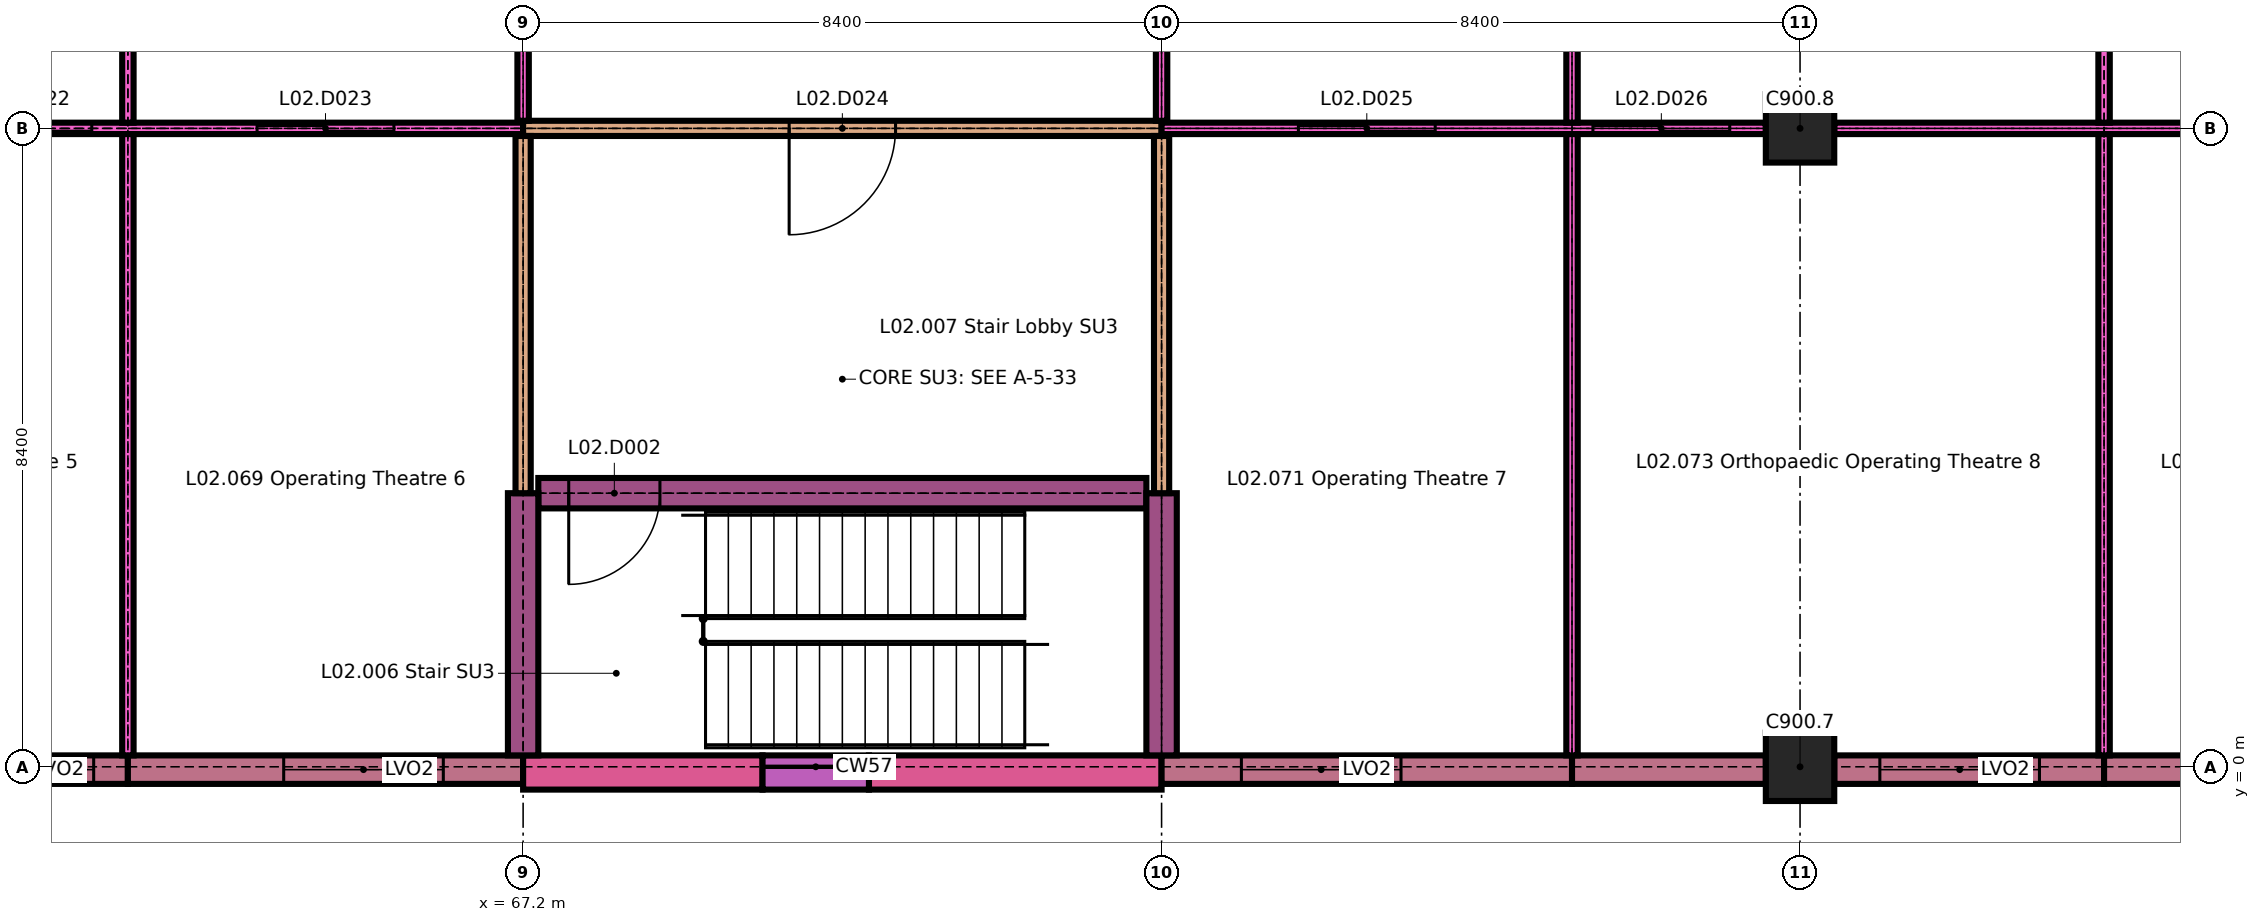
"""IFC4 building model, lengths in metres.
Left out: names, types, materials, properties, quantities, classifications, styles, units other than length and angle.
Written with IfcOpenShell. Run it as: python <this file> out.ifc"""

import sys

from ifc_helpers import new_model, si_unit, direction, frame, frame_2d, origin, origin_2d, place, context, subcontext, project, spatial, rectangle, extrude, element, fill, save


model = new_model("IFC4")
c1 = context("Model", 3, precision=1e-05, world=origin(), true_north=direction((0.0, 1.0)))
c2 = subcontext(c1, "Body", "Model", "MODEL_VIEW")
j1 = project(units=[si_unit("LENGTHUNIT", "METRE"), si_unit("PLANEANGLEUNIT", "RADIAN")], contexts=[c1])
p1 = place(None, origin())
s1 = spatial("IfcSite", under=j1, at=p1, CompositionType="ELEMENT")
p2 = place(p1, origin())
s2 = spatial("IfcBuilding", under=s1, at=p2, CompositionType="ELEMENT")
p3 = place(p2, frame((0.0, 0.0, 8.4)))
s3 = spatial("IfcBuildingStorey", under=s2, at=p3, CompositionType="ELEMENT", Elevation=8.4)
for number, where, z_axis, x_axis in (
    (1, (84.0, 0.0, 0.0), (0.0, 0.0, 1.0), (1.0, 0.0, 0.0)),
    (2, (84.0, 8.4, 0.0), (0.0, 0.0, 1.0), (1.0, 0.0, 0.0)),
):
    element("IfcColumn", number, at=place(p3, frame(where, z_axis=z_axis, x_axis=x_axis)), inside=s3, PredefinedType="COLUMN", context=c2, shape_type="SweptSolid", body=[
        extrude(rectangle(XDim=0.9, YDim=0.9, at=origin_2d()), origin(), (0.0, 0.0, 1.0), 4.2),
    ])
p4 = place(p3, frame((59.25, -0.038, 0.0), z_axis=(0.0, 0.0, 1.0), x_axis=(1.0, 0.0, 0.0)))
e3 = element("IfcWall", 3, at=p4, inside=s3, PredefinedType="SOLIDWALL", context=c2, shape_type="SweptSolid", body=[
    extrude(rectangle(XDim=2.75, YDim=0.375, at=frame_2d((1.375, 0.0))), origin(), (0.0, 0.0, 1.0), 3.9),
])
p5 = place(p4, frame((0.2, 0.0, 0.9)))
e4 = element("IfcOpeningElement", 4, at=p5, cuts=e3, PredefinedType="OPENING", context=c2, shape_type="SweptSolid", body=[
    extrude(rectangle(XDim=2.1, YDim=2.4, at=frame_2d((1.05, 1.2))), frame((0.0, 0.198, 0.0), z_axis=(0.0, -1.0, 0.0), x_axis=(1.0, 0.0, 0.0)), (0.0, 0.0, 1.0), 0.395),
])
p6 = place(p3, frame((62.0, -0.038, 0.0), z_axis=(0.0, 0.0, 1.0), x_axis=(1.0, 0.0, 0.0)))
e5 = element("IfcWall", 5, at=p6, inside=s3, PredefinedType="SOLIDWALL", context=c2, shape_type="SweptSolid", body=[
    extrude(rectangle(XDim=5.2, YDim=0.375, at=frame_2d((2.6, 0.0))), origin(), (0.0, 0.0, 1.0), 3.9),
])
p7 = place(p6, frame((2.05, 0.0, 0.9)))
e6 = element("IfcOpeningElement", 6, at=p7, cuts=e5, PredefinedType="OPENING", context=c2, shape_type="SweptSolid", body=[
    extrude(rectangle(XDim=2.1, YDim=2.4, at=frame_2d((1.05, 1.2))), frame((0.0, 0.198, 0.0), z_axis=(0.0, -1.0, 0.0), x_axis=(1.0, 0.0, 0.0)), (0.0, 0.0, 1.0), 0.395),
])
p8 = place(p3, frame((67.2, -0.075, 0.0), z_axis=(0.0, 0.0, 1.0), x_axis=(1.0, 0.0, 0.0)))
e7 = element("IfcWall", 7, at=p8, inside=s3, PredefinedType="SOLIDWALL", context=c2, shape_type="SweptSolid", body=[
    extrude(rectangle(XDim=3.15, YDim=0.45, at=frame_2d((1.575, 0.0))), origin(), (0.0, 0.0, 1.0), 4.2),
])
p9 = place(p3, frame((71.75, -0.075, 0.0), z_axis=(0.0, 0.0, 1.0), x_axis=(1.0, 0.0, 0.0)))
e8 = element("IfcWall", 8, at=p9, inside=s3, PredefinedType="SOLIDWALL", context=c2, shape_type="SweptSolid", body=[
    extrude(rectangle(XDim=3.85, YDim=0.45, at=frame_2d((1.925, 0.0))), origin(), (0.0, 0.0, 1.0), 4.2),
])
p10 = place(p3, frame((70.35, -0.075, 0.0), z_axis=(0.0, 0.0, 1.0), x_axis=(1.0, 0.0, 0.0)))
e9 = element("IfcWall", 9, at=p10, inside=s3, PredefinedType="SOLIDWALL", context=c2, shape_type="SweptSolid", body=[
    extrude(rectangle(XDim=1.4, YDim=0.45, at=frame_2d((0.7, 0.0))), origin(), (0.0, 0.0, 1.0), 0.6),
])
p11 = place(p3, frame((75.6, -0.038, 0.0), z_axis=(0.0, 0.0, 1.0), x_axis=(1.0, 0.0, 0.0)))
e10 = element("IfcWall", 10, at=p11, inside=s3, PredefinedType="SOLIDWALL", context=c2, shape_type="SweptSolid", body=[
    extrude(rectangle(XDim=5.4, YDim=0.375, at=frame_2d((2.7, 0.0))), origin(), (0.0, 0.0, 1.0), 3.9),
])
p12 = place(p11, frame((1.05, 0.0, 0.9)))
e11 = element("IfcOpeningElement", 11, at=p12, cuts=e10, PredefinedType="OPENING", context=c2, shape_type="SweptSolid", body=[
    extrude(rectangle(XDim=2.1, YDim=2.4, at=frame_2d((1.05, 1.2))), frame((0.0, 0.198, 0.0), z_axis=(0.0, -1.0, 0.0), x_axis=(1.0, 0.0, 0.0)), (0.0, 0.0, 1.0), 0.395),
])
p13 = place(p3, frame((81.0, -0.038, 0.0), z_axis=(0.0, 0.0, 1.0), x_axis=(1.0, 0.0, 0.0)))
e12 = element("IfcWall", 12, at=p13, inside=s3, PredefinedType="SOLIDWALL", context=c2, shape_type="SweptSolid", body=[
    extrude(rectangle(XDim=2.55, YDim=0.375, at=frame_2d((1.275, 0.0))), origin(), (0.0, 0.0, 1.0), 3.9),
])
p14 = place(p3, frame((84.45, -0.038, 0.0), z_axis=(0.0, 0.0, 1.0), x_axis=(1.0, 0.0, 0.0)))
e13 = element("IfcWall", 13, at=p14, inside=s3, PredefinedType="SOLIDWALL", context=c2, shape_type="SweptSolid", body=[
    extrude(rectangle(XDim=3.55, YDim=0.375, at=frame_2d((1.775, 0.0))), origin(), (0.0, 0.0, 1.0), 3.9),
])
p15 = place(p14, frame((0.6, 0.0, 0.9)))
e14 = element("IfcOpeningElement", 14, at=p15, cuts=e13, PredefinedType="OPENING", context=c2, shape_type="SweptSolid", body=[
    extrude(rectangle(XDim=2.1, YDim=2.4, at=frame_2d((1.05, 1.2))), frame((0.0, 0.198, 0.0), z_axis=(0.0, -1.0, 0.0), x_axis=(1.0, 0.0, 0.0)), (0.0, 0.0, 1.0), 0.395),
])
p16 = place(p3, frame((88.0, -0.038, 0.0), z_axis=(0.0, 0.0, 1.0), x_axis=(1.0, 0.0, 0.0)))
e15 = element("IfcWall", 15, at=p16, inside=s3, PredefinedType="SOLIDWALL", context=c2, shape_type="SweptSolid", body=[
    extrude(rectangle(XDim=3.95, YDim=0.375, at=frame_2d((1.975, 0.0))), origin(), (0.0, 0.0, 1.0), 3.9),
])
p17 = place(p16, frame((1.25, 0.0, 0.9)))
e16 = element("IfcOpeningElement", 16, at=p17, cuts=e15, PredefinedType="OPENING", context=c2, shape_type="SweptSolid", body=[
    extrude(rectangle(XDim=2.1, YDim=2.4, at=frame_2d((1.05, 1.2))), frame((0.0, 0.198, 0.0), z_axis=(0.0, -1.0, 0.0), x_axis=(1.0, 0.0, 0.0)), (0.0, 0.0, 1.0), 0.395),
])
p18 = place(p3, frame((67.4, 3.6, 0.0), z_axis=(0.0, 0.0, 1.0), x_axis=(1.0, 0.0, 0.0)))
e17 = element("IfcWall", 17, at=p18, inside=s3, PredefinedType="SHEAR", context=c2, shape_type="SweptSolid", body=[
    extrude(rectangle(XDim=8.0, YDim=0.4, at=frame_2d((4.0, 0.0))), origin(), (0.0, 0.0, 1.0), 4.2),
])
p19 = place(p18, frame((0.4, 0.0, 0.0)))
e18 = element("IfcOpeningElement", 18, at=p19, cuts=e17, PredefinedType="OPENING", context=c2, shape_type="SweptSolid", body=[
    extrude(rectangle(XDim=1.2, YDim=2.1, at=frame_2d((0.6, 1.05))), frame((0.0, 0.21, 0.0), z_axis=(0.0, -1.0, 0.0), x_axis=(1.0, 0.0, 0.0)), (0.0, 0.0, 1.0), 0.42),
])
p20 = place(p3, frame((59.25, 8.4, 0.0), z_axis=(0.0, 0.0, 1.0), x_axis=(1.0, 0.0, 0.0)))
e19 = element("IfcWall", 19, at=p20, inside=s3, PredefinedType="PARTITIONING", context=c2, shape_type="SweptSolid", body=[
    extrude(rectangle(XDim=7.95, YDim=0.15, at=frame_2d((3.975, 0.0))), origin(), (0.0, 0.0, 1.0), 4.2),
])
p21 = place(p20, frame((0.475, 0.0, 0.0)))
e20 = element("IfcOpeningElement", 20, at=p21, cuts=e19, PredefinedType="OPENING", context=c2, shape_type="SweptSolid", body=[
    extrude(rectangle(XDim=1.8, YDim=2.4, at=frame_2d((0.9, 1.2))), frame((0.0, 0.085, 0.0), z_axis=(0.0, -1.0, 0.0), x_axis=(1.0, 0.0, 0.0)), (0.0, 0.0, 1.0), 0.17),
])
p22 = place(p20, frame((4.45, 0.0, 0.0)))
e21 = element("IfcOpeningElement", 21, at=p22, cuts=e19, PredefinedType="OPENING", context=c2, shape_type="SweptSolid", body=[
    extrude(rectangle(XDim=1.8, YDim=2.4, at=frame_2d((0.9, 1.2))), frame((0.0, 0.085, 0.0), z_axis=(0.0, -1.0, 0.0), x_axis=(1.0, 0.0, 0.0)), (0.0, 0.0, 1.0), 0.17),
])
p23 = place(p3, frame((67.2, 8.4, 0.0), z_axis=(0.0, 0.0, 1.0), x_axis=(1.0, 0.0, 0.0)))
e22 = element("IfcWall", 22, at=p23, inside=s3, PredefinedType="PARTITIONING", context=c2, shape_type="SweptSolid", body=[
    extrude(rectangle(XDim=8.4, YDim=0.2, at=frame_2d((4.2, 0.0))), origin(), (0.0, 0.0, 1.0), 4.2),
])
p24 = place(p23, frame((3.5, 0.0, 0.0)))
e23 = element("IfcOpeningElement", 23, at=p24, cuts=e22, PredefinedType="OPENING", context=c2, shape_type="SweptSolid", body=[
    extrude(rectangle(XDim=1.4, YDim=2.1, at=frame_2d((0.7, 1.05))), frame((0.0, 0.11, 0.0), z_axis=(0.0, -1.0, 0.0), x_axis=(1.0, 0.0, 0.0)), (0.0, 0.0, 1.0), 0.22),
])
p25 = place(p3, frame((75.6, 8.4, 0.0), z_axis=(0.0, 0.0, 1.0), x_axis=(1.0, 0.0, 0.0)))
e24 = element("IfcWall", 24, at=p25, inside=s3, PredefinedType="PARTITIONING", context=c2, shape_type="SweptSolid", body=[
    extrude(rectangle(XDim=7.95, YDim=0.15, at=frame_2d((3.975, 0.0))), origin(), (0.0, 0.0, 1.0), 4.2),
])
p26 = place(p25, frame((1.8, 0.0, 0.0)))
e25 = element("IfcOpeningElement", 25, at=p26, cuts=e24, PredefinedType="OPENING", context=c2, shape_type="SweptSolid", body=[
    extrude(rectangle(XDim=1.8, YDim=2.4, at=frame_2d((0.9, 1.2))), frame((0.0, 0.085, 0.0), z_axis=(0.0, -1.0, 0.0), x_axis=(1.0, 0.0, 0.0)), (0.0, 0.0, 1.0), 0.17),
])
p27 = place(p25, frame((5.675, 0.0, 0.0)))
e26 = element("IfcOpeningElement", 26, at=p27, cuts=e24, PredefinedType="OPENING", context=c2, shape_type="SweptSolid", body=[
    extrude(rectangle(XDim=1.8, YDim=2.4, at=frame_2d((0.9, 1.2))), frame((0.0, 0.085, 0.0), z_axis=(0.0, -1.0, 0.0), x_axis=(1.0, 0.0, 0.0)), (0.0, 0.0, 1.0), 0.17),
])
p28 = place(p3, frame((84.45, 8.4, 0.0), z_axis=(0.0, 0.0, 1.0), x_axis=(1.0, 0.0, 0.0)))
e27 = element("IfcWall", 27, at=p28, inside=s3, PredefinedType="PARTITIONING", context=c2, shape_type="SweptSolid", body=[
    extrude(rectangle(XDim=7.5, YDim=0.15, at=frame_2d((3.75, 0.0))), origin(), (0.0, 0.0, 1.0), 4.2),
])
p29 = place(p28, frame((4.625, 0.0, 0.0)))
e28 = element("IfcOpeningElement", 28, at=p29, cuts=e27, PredefinedType="OPENING", context=c2, shape_type="SweptSolid", body=[
    extrude(rectangle(XDim=1.8, YDim=2.4, at=frame_2d((0.9, 1.2))), frame((0.0, 0.085, 0.0), z_axis=(0.0, -1.0, 0.0), x_axis=(1.0, 0.0, 0.0)), (0.0, 0.0, 1.0), 0.17),
])
p30 = place(p3, frame((62.0, 0.15, 0.0), z_axis=(0.0, 0.0, 1.0), x_axis=(0.0, 1.0, 0.0)))
e29 = element("IfcWall", 29, at=p30, inside=s3, PredefinedType="PARTITIONING", context=c2, shape_type="SweptSolid", body=[
    extrude(rectangle(XDim=8.175, YDim=0.15, at=frame_2d((4.087, 0.0))), origin(), (0.0, 0.0, 1.0), 4.2),
])
p31 = place(p3, frame((62.0, 8.475, 0.0), z_axis=(0.0, 0.0, 1.0), x_axis=(0.0, 1.0, 0.0)))
e30 = element("IfcWall", 30, at=p31, inside=s3, PredefinedType="PARTITIONING", context=c2, shape_type="SweptSolid", body=[
    extrude(rectangle(XDim=5.25, YDim=0.15, at=frame_2d((2.625, 0.0))), origin(), (0.0, 0.0, 1.0), 4.2),
])
p32 = place(p3, frame((67.2, 0.15, 0.0), z_axis=(0.0, 0.0, 1.0), x_axis=(0.0, 1.0, 0.0)))
e31 = element("IfcWall", 31, at=p32, inside=s3, PredefinedType="SHEAR", context=c2, shape_type="SweptSolid", body=[
    extrude(rectangle(XDim=3.45, YDim=0.4, at=frame_2d((1.725, 0.0))), origin(), (0.0, 0.0, 1.0), 4.2),
])
p33 = place(p3, frame((67.2, 3.6, 0.0), z_axis=(0.0, 0.0, 1.0), x_axis=(0.0, 1.0, 0.0)))
e32 = element("IfcWall", 32, at=p33, inside=s3, PredefinedType="PARTITIONING", context=c2, shape_type="SweptSolid", body=[
    extrude(rectangle(XDim=4.7, YDim=0.2, at=frame_2d((2.35, 0.0))), origin(), (0.0, 0.0, 1.0), 4.2),
])
p34 = place(p3, frame((67.2, 8.5, 0.0), z_axis=(0.0, 0.0, 1.0), x_axis=(0.0, 1.0, 0.0)))
e33 = element("IfcWall", 33, at=p34, inside=s3, PredefinedType="PARTITIONING", context=c2, shape_type="SweptSolid", body=[
    extrude(rectangle(XDim=5.225, YDim=0.15, at=frame_2d((2.613, 0.0))), origin(), (0.0, 0.0, 1.0), 4.2),
])
p35 = place(p3, frame((75.6, 0.15, 0.0), z_axis=(0.0, 0.0, 1.0), x_axis=(0.0, 1.0, 0.0)))
e34 = element("IfcWall", 34, at=p35, inside=s3, PredefinedType="SHEAR", context=c2, shape_type="SweptSolid", body=[
    extrude(rectangle(XDim=3.45, YDim=0.4, at=frame_2d((1.725, 0.0))), origin(), (0.0, 0.0, 1.0), 4.2),
])
p36 = place(p3, frame((75.6, 3.6, 0.0), z_axis=(0.0, 0.0, 1.0), x_axis=(0.0, 1.0, 0.0)))
e35 = element("IfcWall", 35, at=p36, inside=s3, PredefinedType="PARTITIONING", context=c2, shape_type="SweptSolid", body=[
    extrude(rectangle(XDim=4.7, YDim=0.2, at=frame_2d((2.35, 0.0))), origin(), (0.0, 0.0, 1.0), 4.2),
])
p37 = place(p3, frame((75.6, 8.5, 0.0), z_axis=(0.0, 0.0, 1.0), x_axis=(0.0, 1.0, 0.0)))
e36 = element("IfcWall", 36, at=p37, inside=s3, PredefinedType="PARTITIONING", context=c2, shape_type="SweptSolid", body=[
    extrude(rectangle(XDim=5.225, YDim=0.15, at=frame_2d((2.613, 0.0))), origin(), (0.0, 0.0, 1.0), 4.2),
])
p38 = place(p3, frame((81.0, 0.15, 0.0), z_axis=(0.0, 0.0, 1.0), x_axis=(0.0, 1.0, 0.0)))
e37 = element("IfcWall", 37, at=p38, inside=s3, PredefinedType="PARTITIONING", context=c2, shape_type="SweptSolid", body=[
    extrude(rectangle(XDim=8.175, YDim=0.15, at=frame_2d((4.087, 0.0))), origin(), (0.0, 0.0, 1.0), 4.2),
])
p39 = place(p3, frame((81.0, 8.475, 0.0), z_axis=(0.0, 0.0, 1.0), x_axis=(0.0, 1.0, 0.0)))
e38 = element("IfcWall", 38, at=p39, inside=s3, PredefinedType="PARTITIONING", context=c2, shape_type="SweptSolid", body=[
    extrude(rectangle(XDim=5.25, YDim=0.15, at=frame_2d((2.625, 0.0))), origin(), (0.0, 0.0, 1.0), 4.2),
])
p40 = place(p3, frame((88.0, 0.15, 0.0), z_axis=(0.0, 0.0, 1.0), x_axis=(0.0, 1.0, 0.0)))
e39 = element("IfcWall", 39, at=p40, inside=s3, PredefinedType="PARTITIONING", context=c2, shape_type="SweptSolid", body=[
    extrude(rectangle(XDim=8.175, YDim=0.15, at=frame_2d((4.087, 0.0))), origin(), (0.0, 0.0, 1.0), 4.2),
])
p41 = place(p3, frame((88.0, 8.475, 0.0), z_axis=(0.0, 0.0, 1.0), x_axis=(0.0, 1.0, 0.0)))
e40 = element("IfcWall", 40, at=p41, inside=s3, PredefinedType="PARTITIONING", context=c2, shape_type="SweptSolid", body=[
    extrude(rectangle(XDim=5.25, YDim=0.15, at=frame_2d((2.625, 0.0))), origin(), (0.0, 0.0, 1.0), 4.2),
])
p42 = place(p5, origin())
e41 = element("IfcWindow", 41, at=p42, inside=s3, PartitioningType="SINGLE_PANEL", PredefinedType="WINDOW", context=c2, shape_type="SweptSolid", body=[
    extrude(rectangle(XDim=2.1, YDim=2.4, at=frame_2d((1.05, 1.2))), frame((0.0, 0.075, 0.0), z_axis=(0.0, -1.0, 0.0), x_axis=(1.0, 0.0, 0.0)), (0.0, 0.0, 1.0), 0.15),
])
fill(e4, e41)
p43 = place(p7, origin())
e42 = element("IfcWindow", 42, at=p43, inside=s3, PartitioningType="SINGLE_PANEL", PredefinedType="WINDOW", context=c2, shape_type="SweptSolid", body=[
    extrude(rectangle(XDim=2.1, YDim=2.4, at=frame_2d((1.05, 1.2))), frame((0.0, 0.075, 0.0), z_axis=(0.0, -1.0, 0.0), x_axis=(1.0, 0.0, 0.0)), (0.0, 0.0, 1.0), 0.15),
])
fill(e6, e42)
p44 = place(p12, origin())
e43 = element("IfcWindow", 43, at=p44, inside=s3, PartitioningType="SINGLE_PANEL", PredefinedType="WINDOW", context=c2, shape_type="SweptSolid", body=[
    extrude(rectangle(XDim=2.1, YDim=2.4, at=frame_2d((1.05, 1.2))), frame((0.0, 0.075, 0.0), z_axis=(0.0, -1.0, 0.0), x_axis=(1.0, 0.0, 0.0)), (0.0, 0.0, 1.0), 0.15),
])
fill(e11, e43)
p45 = place(p15, origin())
e44 = element("IfcWindow", 44, at=p45, inside=s3, PartitioningType="SINGLE_PANEL", PredefinedType="WINDOW", context=c2, shape_type="SweptSolid", body=[
    extrude(rectangle(XDim=2.1, YDim=2.4, at=frame_2d((1.05, 1.2))), frame((0.0, 0.075, 0.0), z_axis=(0.0, -1.0, 0.0), x_axis=(1.0, 0.0, 0.0)), (0.0, 0.0, 1.0), 0.15),
])
fill(e14, e44)
p46 = place(p19, origin())
e45 = element("IfcDoor", 45, at=p46, inside=s3, OperationType="SINGLE_SWING_LEFT", PredefinedType="DOOR", context=c2, shape_type="SweptSolid", body=[
    extrude(rectangle(XDim=1.2, YDim=2.1, at=frame_2d((0.6, 1.05))), frame((0.0, 0.025, 0.0), z_axis=(0.0, -1.0, 0.0), x_axis=(1.0, 0.0, 0.0)), (0.0, 0.0, 1.0), 0.05),
])
fill(e18, e45)
p47 = place(p21, origin())
e46 = element("IfcDoor", 46, at=p47, inside=s3, OperationType="DOUBLE_DOOR_SLIDING", PredefinedType="DOOR", context=c2, shape_type="SweptSolid", body=[
    extrude(rectangle(XDim=1.8, YDim=2.4, at=frame_2d((0.9, 1.2))), frame((0.0, 0.045, 0.0), z_axis=(0.0, -1.0, 0.0), x_axis=(1.0, 0.0, 0.0)), (0.0, 0.0, 1.0), 0.09),
])
fill(e20, e46)
p48 = place(p22, origin())
e47 = element("IfcDoor", 47, at=p48, inside=s3, OperationType="DOUBLE_DOOR_SLIDING", PredefinedType="DOOR", context=c2, shape_type="SweptSolid", body=[
    extrude(rectangle(XDim=1.8, YDim=2.4, at=frame_2d((0.9, 1.2))), frame((0.0, 0.045, 0.0), z_axis=(0.0, -1.0, 0.0), x_axis=(1.0, 0.0, 0.0)), (0.0, 0.0, 1.0), 0.09),
])
fill(e21, e47)
p49 = place(p24, origin())
e48 = element("IfcDoor", 48, at=p49, inside=s3, OperationType="SINGLE_SWING_LEFT", PredefinedType="DOOR", context=c2, shape_type="SweptSolid", body=[
    extrude(rectangle(XDim=1.4, YDim=2.1, at=frame_2d((0.7, 1.05))), frame((0.0, 0.025, 0.0), z_axis=(0.0, -1.0, 0.0), x_axis=(1.0, 0.0, 0.0)), (0.0, 0.0, 1.0), 0.05),
])
fill(e23, e48)
p50 = place(p26, origin())
e49 = element("IfcDoor", 49, at=p50, inside=s3, OperationType="DOUBLE_DOOR_SLIDING", PredefinedType="DOOR", context=c2, shape_type="SweptSolid", body=[
    extrude(rectangle(XDim=1.8, YDim=2.4, at=frame_2d((0.9, 1.2))), frame((0.0, 0.045, 0.0), z_axis=(0.0, -1.0, 0.0), x_axis=(1.0, 0.0, 0.0)), (0.0, 0.0, 1.0), 0.09),
])
fill(e25, e49)
p51 = place(p27, origin())
e50 = element("IfcDoor", 50, at=p51, inside=s3, OperationType="DOUBLE_DOOR_SLIDING", PredefinedType="DOOR", context=c2, shape_type="SweptSolid", body=[
    extrude(rectangle(XDim=1.8, YDim=2.4, at=frame_2d((0.9, 1.2))), frame((0.0, 0.045, 0.0), z_axis=(0.0, -1.0, 0.0), x_axis=(1.0, 0.0, 0.0)), (0.0, 0.0, 1.0), 0.09),
])
fill(e26, e50)
save(model, sys.argv[1])
